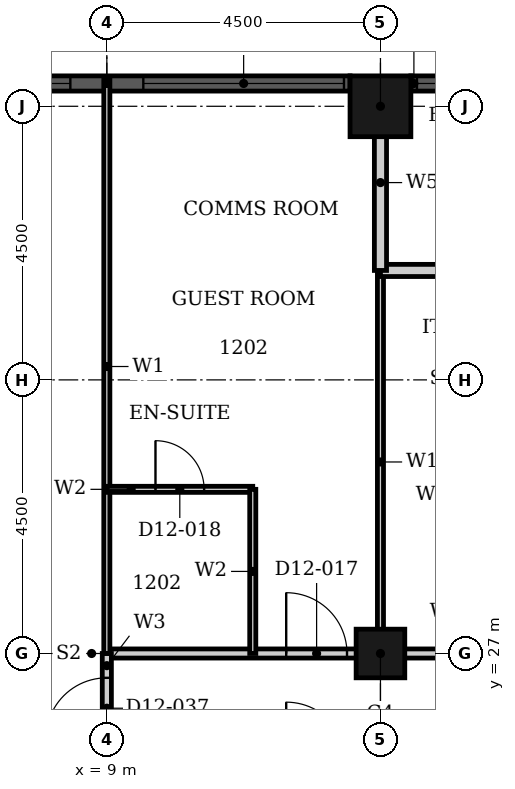
"""IFC4 building model, lengths in metres.
Left out: names, types, materials, properties, quantities, classifications, styles, units other than length and angle.
Written with IfcOpenShell. Run it as: python <this file> out.ifc"""

import sys

from ifc_helpers import new_model, si_unit, direction, frame, frame_2d, origin, origin_2d, place, context, subcontext, project, spatial, rectangle, hollow_rectangle, extrude, element, fill, save


model = new_model("IFC4")
c1 = context("Model", 3, precision=1e-05, world=origin(), true_north=direction((0.0, 1.0)))
c2 = subcontext(c1, "Body", "Model", "MODEL_VIEW")
j1 = project(units=[si_unit("LENGTHUNIT", "METRE"), si_unit("PLANEANGLEUNIT", "RADIAN")], contexts=[c1])
p1 = place(None, origin())
s1 = spatial("IfcSite", under=j1, at=p1, CompositionType="ELEMENT")
p2 = place(p1, origin())
s2 = spatial("IfcBuilding", under=s1, at=p2, CompositionType="ELEMENT")
p3 = place(p2, frame((0.0, 0.0, 56.4)))
s3 = spatial("IfcBuildingStorey", under=s2, at=p3, CompositionType="ELEMENT", Elevation=56.4)
p4 = place(p3, frame((13.5, 36.0, 0.0), z_axis=(0.0, 0.0, 1.0), x_axis=(1.0, 0.0, 0.0)))
e1 = element("IfcColumn", 1, at=p4, inside=s3, PredefinedType="COLUMN", context=c2, shape_type="SweptSolid", body=[
    extrude(hollow_rectangle(XDim=1.0, YDim=1.0, WallThickness=0.032, at=origin_2d()), origin(), (0.0, 0.0, 1.0), 3.6),
])
p5 = place(p3, frame((13.5, 27.0, 0.0), z_axis=(0.0, 0.0, 1.0), x_axis=(1.0, 0.0, 0.0)))
e2 = element("IfcColumn", 2, at=p5, inside=s3, PredefinedType="COLUMN", context=c2, shape_type="SweptSolid", body=[
    extrude(hollow_rectangle(XDim=0.8, YDim=0.8, WallThickness=0.025, at=origin_2d()), origin(), (0.0, 0.0, 1.0), 3.6),
])
p6 = place(p3, frame((15.25, 36.375, 0.0), z_axis=(0.0, 0.0, 1.0), x_axis=(-1.0, 0.0, 0.0)))
e3 = element("IfcWall", 3, at=p6, inside=s3, PredefinedType="SOLIDWALL", context=c2, shape_type="SweptSolid", body=[
    extrude(rectangle(XDim=1.25, YDim=0.25, at=frame_2d((0.625, 0.0))), origin(), (0.0, 0.0, 1.0), 3.6),
])
p7 = place(p6, frame((0.1, 0.0, 0.9)))
e4 = element("IfcOpeningElement", 4, at=p7, cuts=e3, PredefinedType="OPENING", context=c2, shape_type="SweptSolid", body=[
    extrude(rectangle(XDim=1.05, YDim=2.08, at=frame_2d((0.525, 1.04))), frame((0.0, 0.135, 0.0), z_axis=(0.0, -1.0, 0.0), x_axis=(1.0, 0.0, 0.0)), (0.0, 0.0, 1.0), 0.27),
])
p8 = place(p3, frame((13.0, 36.375, 0.0), z_axis=(0.0, 0.0, 1.0), x_axis=(-1.0, 0.0, 0.0)))
e5 = element("IfcWall", 5, at=p8, inside=s3, PredefinedType="SOLIDWALL", context=c2, shape_type="SweptSolid", body=[
    extrude(rectangle(XDim=8.0, YDim=0.25, at=frame_2d((4.0, 0.0))), origin(), (0.0, 0.0, 1.0), 3.6),
])
p9 = place(p8, frame((0.1, 0.0, 0.9)))
e6 = element("IfcOpeningElement", 6, at=p9, cuts=e5, PredefinedType="OPENING", context=c2, shape_type="SweptSolid", body=[
    extrude(rectangle(XDim=3.3, YDim=2.08, at=frame_2d((1.65, 1.04))), frame((0.0, 0.135, 0.0), z_axis=(0.0, -1.0, 0.0), x_axis=(1.0, 0.0, 0.0)), (0.0, 0.0, 1.0), 0.27),
])
p10 = place(p8, frame((4.6, 0.0, 0.9)))
e7 = element("IfcOpeningElement", 7, at=p10, cuts=e5, PredefinedType="OPENING", context=c2, shape_type="SweptSolid", body=[
    extrude(rectangle(XDim=3.3, YDim=2.08, at=frame_2d((1.65, 1.04))), frame((0.0, 0.135, 0.0), z_axis=(0.0, -1.0, 0.0), x_axis=(1.0, 0.0, 0.0)), (0.0, 0.0, 1.0), 0.27),
])
p11 = place(p3, frame((9.0, 27.0, 0.0), z_axis=(0.0, 0.0, 1.0), x_axis=(1.0, 0.0, 0.0)))
e8 = element("IfcWall", 8, at=p11, inside=s3, PredefinedType="PARTITIONING", context=c2, shape_type="SweptSolid", body=[
    extrude(rectangle(XDim=7.2, YDim=0.15, at=frame_2d((3.6, 0.0))), origin(), (0.0, 0.0, 1.0), 2.58),
])
p12 = place(p11, frame((2.95, 0.0, 0.0)))
e9 = element("IfcOpeningElement", 9, at=p12, cuts=e8, PredefinedType="OPENING", context=c2, shape_type="SweptSolid", body=[
    extrude(rectangle(XDim=1.0, YDim=2.1, at=frame_2d((0.5, 1.05))), frame((0.0, 0.085, 0.0), z_axis=(0.0, -1.0, 0.0), x_axis=(1.0, 0.0, 0.0)), (0.0, 0.0, 1.0), 0.17),
])
p13 = place(p3, frame((9.0, 25.2, 0.0), z_axis=(0.0, 0.0, 1.0), x_axis=(0.0, 1.0, 0.0)))
e10 = element("IfcWall", 10, at=p13, inside=s3, PredefinedType="PARTITIONING", context=c2, shape_type="SweptSolid", body=[
    extrude(rectangle(XDim=1.8, YDim=0.15, at=frame_2d((0.9, 0.0))), origin(), (0.0, 0.0, 1.0), 3.3),
])
p14 = place(p13, frame((0.4, 0.0, 0.0)))
e11 = element("IfcOpeningElement", 11, at=p14, cuts=e10, PredefinedType="OPENING", context=c2, shape_type="SweptSolid", body=[
    extrude(rectangle(XDim=1.0, YDim=2.1, at=frame_2d((0.5, 1.05))), frame((0.0, 0.085, 0.0), z_axis=(0.0, -1.0, 0.0), x_axis=(1.0, 0.0, 0.0)), (0.0, 0.0, 1.0), 0.17),
])
p15 = place(p3, frame((13.5, 27.0, 0.0), z_axis=(0.0, 0.0, 1.0), x_axis=(0.0, 1.0, 0.0)))
e12 = element("IfcWall", 12, at=p15, inside=s3, PredefinedType="PARTITIONING", context=c2, shape_type="SweptSolid", body=[
    extrude(rectangle(XDim=6.3, YDim=0.1, at=frame_2d((3.15, 0.0))), origin(), (0.0, 0.0, 1.0), 2.38),
])
p16 = place(p3, frame((9.0, 27.0, 0.0), z_axis=(0.0, 0.0, 1.0), x_axis=(0.0, 1.0, 0.0)))
e13 = element("IfcWall", 13, at=p16, inside=s3, PredefinedType="PARTITIONING", context=c2, shape_type="SweptSolid", body=[
    extrude(rectangle(XDim=9.44, YDim=0.1, at=frame_2d((4.72, 0.0))), origin(), (0.0, 0.0, 1.0), 3.3),
])
p17 = place(p3, frame((9.0, 29.7, 0.0), z_axis=(0.0, 0.0, 1.0), x_axis=(1.0, 0.0, 0.0)))
e14 = element("IfcWall", 14, at=p17, inside=s3, PredefinedType="PARTITIONING", context=c2, shape_type="SweptSolid", body=[
    extrude(rectangle(XDim=2.4, YDim=0.1, at=frame_2d((1.2, 0.0))), origin(), (0.0, 0.0, 1.0), 3.3),
])
p18 = place(p17, frame((0.8, 0.0, 0.0)))
e15 = element("IfcOpeningElement", 15, at=p18, cuts=e14, PredefinedType="OPENING", context=c2, shape_type="SweptSolid", body=[
    extrude(rectangle(XDim=0.8, YDim=2.1, at=frame_2d((0.4, 1.05))), frame((0.0, 0.06, 0.0), z_axis=(0.0, -1.0, 0.0), x_axis=(1.0, 0.0, 0.0)), (0.0, 0.0, 1.0), 0.12),
])
p19 = place(p3, frame((11.4, 27.0, 0.0), z_axis=(0.0, 0.0, 1.0), x_axis=(0.0, 1.0, 0.0)))
e16 = element("IfcWall", 16, at=p19, inside=s3, PredefinedType="PARTITIONING", context=c2, shape_type="SweptSolid", body=[
    extrude(rectangle(XDim=2.7, YDim=0.1, at=frame_2d((1.35, 0.0))), origin(), (0.0, 0.0, 1.0), 3.3),
])
p20 = place(p3, frame((13.5, 33.3, 0.0), z_axis=(0.0, 0.0, 1.0), x_axis=(1.0, 0.0, 0.0)))
e17 = element("IfcWall", 17, at=p20, inside=s3, PredefinedType="PARTITIONING", context=c2, shape_type="SweptSolid", body=[
    extrude(rectangle(XDim=4.5, YDim=0.2, at=frame_2d((2.25, 0.0))), origin(), (0.0, 0.0, 1.0), 3.3),
])
p21 = place(p20, frame((3.15, 0.0, 0.0)))
e18 = element("IfcOpeningElement", 18, at=p21, cuts=e17, PredefinedType="OPENING", context=c2, shape_type="SweptSolid", body=[
    extrude(rectangle(XDim=0.9, YDim=2.1, at=frame_2d((0.45, 1.05))), frame((0.0, 0.11, 0.0), z_axis=(0.0, -1.0, 0.0), x_axis=(1.0, 0.0, 0.0)), (0.0, 0.0, 1.0), 0.22),
])
p22 = place(p3, frame((13.5, 33.3, 0.0), z_axis=(0.0, 0.0, 1.0), x_axis=(0.0, 1.0, 0.0)))
e19 = element("IfcWall", 19, at=p22, inside=s3, PredefinedType="PARTITIONING", context=c2, shape_type="SweptSolid", body=[
    extrude(rectangle(XDim=2.89, YDim=0.2, at=frame_2d((1.445, 0.0))), origin(), (0.0, 0.0, 1.0), 2.38),
])
p23 = place(p7, origin())
e20 = element("IfcWindow", 20, at=p23, inside=s3, PartitioningType="SINGLE_PANEL", PredefinedType="WINDOW", context=c2, shape_type="SweptSolid", body=[
    extrude(rectangle(XDim=1.05, YDim=2.08, at=frame_2d((0.525, 1.04))), frame((0.0, 0.03, 0.0), z_axis=(0.0, -1.0, 0.0), x_axis=(1.0, 0.0, 0.0)), (0.0, 0.0, 1.0), 0.06),
])
fill(e4, e20)
p24 = place(p9, origin())
e21 = element("IfcWindow", 21, at=p24, inside=s3, PartitioningType="SINGLE_PANEL", PredefinedType="WINDOW", context=c2, shape_type="SweptSolid", body=[
    extrude(rectangle(XDim=3.3, YDim=2.08, at=frame_2d((1.65, 1.04))), frame((0.0, 0.03, 0.0), z_axis=(0.0, -1.0, 0.0), x_axis=(1.0, 0.0, 0.0)), (0.0, 0.0, 1.0), 0.06),
])
fill(e6, e21)
p25 = place(p10, origin())
e22 = element("IfcWindow", 22, at=p25, inside=s3, PartitioningType="SINGLE_PANEL", PredefinedType="WINDOW", context=c2, shape_type="SweptSolid", body=[
    extrude(rectangle(XDim=3.3, YDim=2.08, at=frame_2d((1.65, 1.04))), frame((0.0, 0.03, 0.0), z_axis=(0.0, -1.0, 0.0), x_axis=(1.0, 0.0, 0.0)), (0.0, 0.0, 1.0), 0.06),
])
fill(e7, e22)
p26 = place(p12, origin())
e23 = element("IfcDoor", 23, at=p26, inside=s3, OperationType="SINGLE_SWING_RIGHT", PredefinedType="DOOR", context=c2, shape_type="SweptSolid", body=[
    extrude(rectangle(XDim=1.0, YDim=2.1, at=frame_2d((0.5, 1.05))), frame((0.0, 0.025, 0.0), z_axis=(0.0, -1.0, 0.0), x_axis=(1.0, 0.0, 0.0)), (0.0, 0.0, 1.0), 0.05),
])
fill(e9, e23)
p27 = place(p18, origin())
e24 = element("IfcDoor", 24, at=p27, inside=s3, OperationType="SINGLE_SWING_LEFT", PredefinedType="DOOR", context=c2, shape_type="SweptSolid", body=[
    extrude(rectangle(XDim=0.8, YDim=2.1, at=frame_2d((0.4, 1.05))), frame((0.0, 0.025, 0.0), z_axis=(0.0, -1.0, 0.0), x_axis=(1.0, 0.0, 0.0)), (0.0, 0.0, 1.0), 0.05),
])
fill(e15, e24)
p28 = place(p14, origin())
e25 = element("IfcDoor", 25, at=p28, inside=s3, OperationType="SINGLE_SWING_LEFT", PredefinedType="DOOR", context=c2, shape_type="SweptSolid", body=[
    extrude(rectangle(XDim=1.0, YDim=2.1, at=frame_2d((0.5, 1.05))), frame((0.0, 0.025, 0.0), z_axis=(0.0, -1.0, 0.0), x_axis=(1.0, 0.0, 0.0)), (0.0, 0.0, 1.0), 0.05),
])
fill(e11, e25)
save(model, sys.argv[1])
